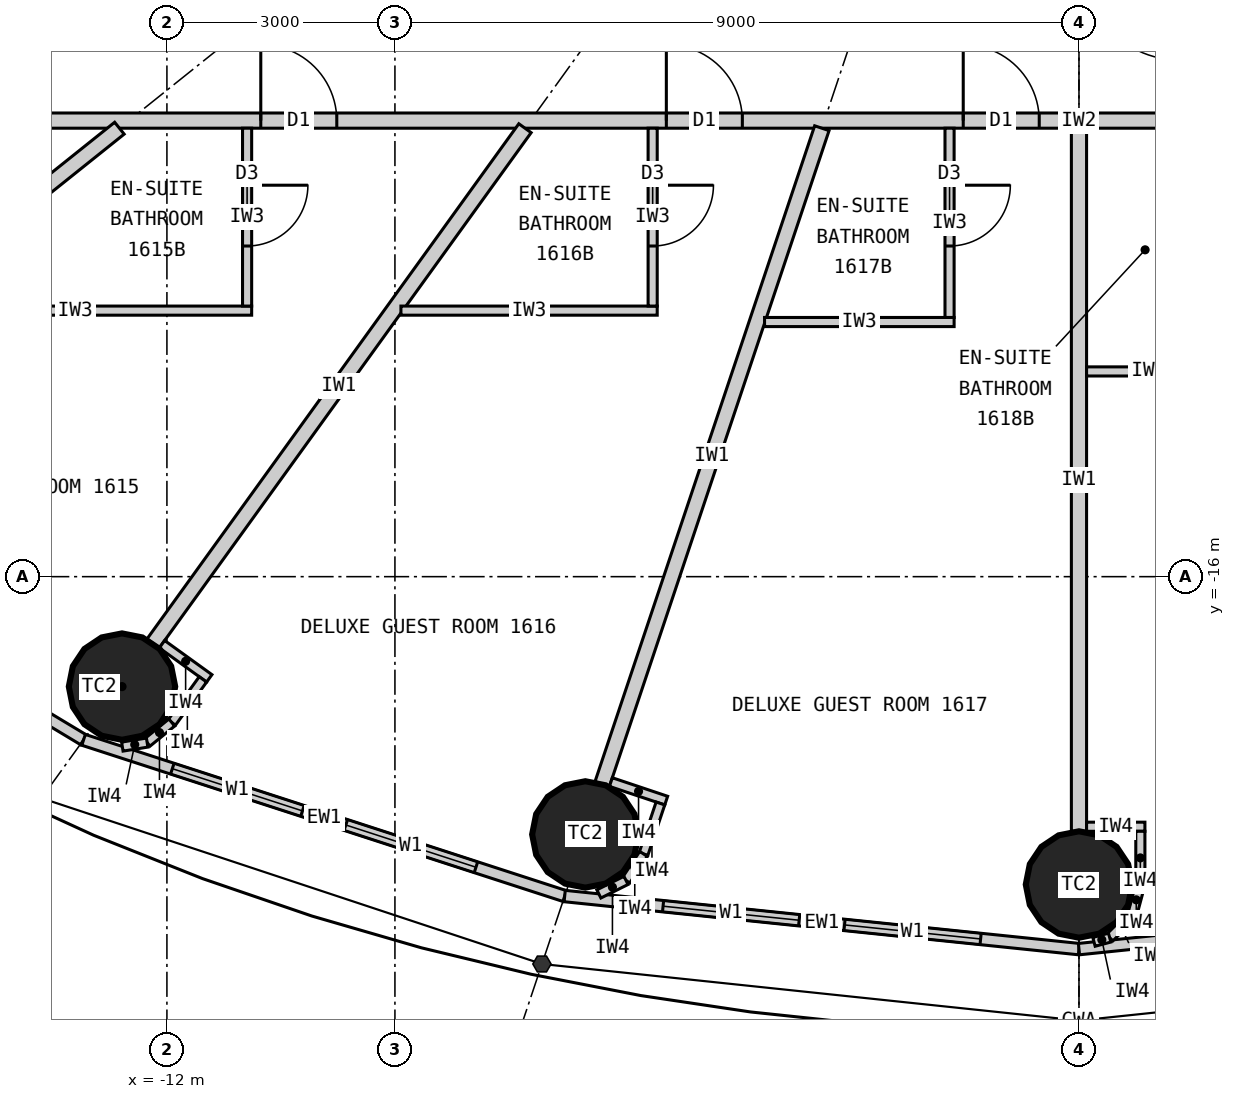
"""IFC4 building model, lengths in metres.
Left out: names, types, materials, properties, quantities, classifications, styles, units other than length and angle.
Written with IfcOpenShell. Run it as: python <this file> out.ifc"""

import sys

from ifc_helpers import new_model, si_unit, direction, frame, frame_2d, origin, origin_2d, place, context, subcontext, project, spatial, rectangle, circle, extrude, element, fill, save


model = new_model("IFC4")
c1 = context("Model", 3, precision=1e-05, world=origin(), true_north=direction((0.0, 1.0)))
c2 = subcontext(c1, "Body", "Model", "MODEL_VIEW")
j1 = project(units=[si_unit("LENGTHUNIT", "METRE"), si_unit("PLANEANGLEUNIT", "RADIAN")], contexts=[c1])
p1 = place(None, origin())
s1 = spatial("IfcSite", under=j1, at=p1, CompositionType="ELEMENT")
p2 = place(p1, origin())
s2 = spatial("IfcBuilding", under=s1, at=p2, CompositionType="ELEMENT")
p3 = place(p2, frame((0.0, 0.0, 67.2)))
s3 = spatial("IfcBuildingStorey", under=s2, at=p3, CompositionType="ELEMENT", Elevation=67.2)
for number, where, z_axis, x_axis in (
    (1, (-12.591, -17.447, 0.0), (0.0, 0.0, 1.0), (1.0, 0.0, 0.0)),
    (2, (-6.495, -19.391, 0.0), (0.0, 0.0, 1.0), (1.0, 0.0, 0.0)),
    (3, (0.0, -20.05, 0.0), (0.0, 0.0, 1.0), (1.0, 0.0, 0.0)),
):
    element("IfcColumn", number, at=place(p3, frame(where, z_axis=z_axis, x_axis=x_axis)), inside=s3, PredefinedType="COLUMN", context=c2, shape_type="SweptSolid", body=[
        extrude(circle(Radius=0.7, at=origin_2d()), origin(), (0.0, 0.0, 1.0), 3.3),
    ])
p4 = place(p3, frame((-18.57, -14.856, 0.0), z_axis=(0.0, 0.0, 1.0), x_axis=(0.856983180864, -0.515344377787, 0.0)))
e4 = element("IfcWall", 4, at=p4, inside=s3, PredefinedType="ELEMENTEDWALL", context=c2, shape_type="SweptSolid", body=[
    extrude(rectangle(XDim=6.386, YDim=0.15, at=frame_2d((3.193, 0.0))), origin(), (0.0, 0.0, 1.0), 3.12),
])
p5 = place(p4, frame((1.093, 0.0, 0.9)))
e5 = element("IfcOpeningElement", 5, at=p5, cuts=e4, PredefinedType="OPENING", context=c2, shape_type="SweptSolid", body=[
    extrude(rectangle(XDim=1.8, YDim=1.9, at=frame_2d((0.9, 0.95))), frame((0.0, 0.085, 0.0), z_axis=(0.0, -1.0, 0.0), x_axis=(1.0, 0.0, 0.0)), (0.0, 0.0, 1.0), 0.17),
])
p6 = place(p4, frame((3.493, 0.0, 0.9)))
e6 = element("IfcOpeningElement", 6, at=p6, cuts=e4, PredefinedType="OPENING", context=c2, shape_type="SweptSolid", body=[
    extrude(rectangle(XDim=1.8, YDim=1.9, at=frame_2d((0.9, 0.95))), frame((0.0, 0.085, 0.0), z_axis=(0.0, -1.0, 0.0), x_axis=(1.0, 0.0, 0.0)), (0.0, 0.0, 1.0), 0.17),
])
p7 = place(p3, frame((-13.096, -18.147, 0.0), z_axis=(0.0, 0.0, 1.0), x_axis=(0.951137534625, -0.308767534285, 0.0)))
e7 = element("IfcWall", 7, at=p7, inside=s3, PredefinedType="ELEMENTEDWALL", context=c2, shape_type="SweptSolid", body=[
    extrude(rectangle(XDim=6.655, YDim=0.15, at=frame_2d((3.328, 0.0))), origin(), (0.0, 0.0, 1.0), 3.12),
])
p8 = place(p7, frame((1.228, 0.0, 0.9)))
e8 = element("IfcOpeningElement", 8, at=p8, cuts=e7, PredefinedType="OPENING", context=c2, shape_type="SweptSolid", body=[
    extrude(rectangle(XDim=1.8, YDim=1.9, at=frame_2d((0.9, 0.95))), frame((0.0, 0.085, 0.0), z_axis=(0.0, -1.0, 0.0), x_axis=(1.0, 0.0, 0.0)), (0.0, 0.0, 1.0), 0.17),
])
p9 = place(p7, frame((3.628, 0.0, 0.9)))
e9 = element("IfcOpeningElement", 9, at=p9, cuts=e7, PredefinedType="OPENING", context=c2, shape_type="SweptSolid", body=[
    extrude(rectangle(XDim=1.8, YDim=1.9, at=frame_2d((0.9, 0.95))), frame((0.0, 0.085, 0.0), z_axis=(0.0, -1.0, 0.0), x_axis=(1.0, 0.0, 0.0)), (0.0, 0.0, 1.0), 0.17),
])
p10 = place(p3, frame((-6.766, -20.202, 0.0), z_axis=(0.0, 0.0, 1.0), x_axis=(0.994721394369, -0.102612609291, 0.0)))
e10 = element("IfcWall", 10, at=p10, inside=s3, PredefinedType="ELEMENTEDWALL", context=c2, shape_type="SweptSolid", body=[
    extrude(rectangle(XDim=6.802, YDim=0.15, at=frame_2d((3.401, 0.0))), origin(), (0.0, 0.0, 1.0), 3.12),
])
p11 = place(p10, frame((1.301, 0.0, 0.9)))
e11 = element("IfcOpeningElement", 11, at=p11, cuts=e10, PredefinedType="OPENING", context=c2, shape_type="SweptSolid", body=[
    extrude(rectangle(XDim=1.8, YDim=1.9, at=frame_2d((0.9, 0.95))), frame((0.0, 0.085, 0.0), z_axis=(0.0, -1.0, 0.0), x_axis=(1.0, 0.0, 0.0)), (0.0, 0.0, 1.0), 0.17),
])
p12 = place(p10, frame((3.701, 0.0, 0.9)))
e12 = element("IfcOpeningElement", 12, at=p12, cuts=e10, PredefinedType="OPENING", context=c2, shape_type="SweptSolid", body=[
    extrude(rectangle(XDim=1.8, YDim=1.9, at=frame_2d((0.9, 0.95))), frame((0.0, 0.085, 0.0), z_axis=(0.0, -1.0, 0.0), x_axis=(1.0, 0.0, 0.0)), (0.0, 0.0, 1.0), 0.17),
])
p13 = place(p3, frame((0.0, -20.9, 0.0), z_axis=(0.0, 0.0, 1.0), x_axis=(0.994721394369, 0.102612609291, 0.0)))
e13 = element("IfcWall", 13, at=p13, inside=s3, PredefinedType="ELEMENTEDWALL", context=c2, shape_type="SweptSolid", body=[
    extrude(rectangle(XDim=6.802, YDim=0.15, at=frame_2d((3.401, 0.0))), origin(), (0.0, 0.0, 1.0), 3.12),
])
p14 = place(p13, frame((1.301, 0.0, 0.9)))
e14 = element("IfcOpeningElement", 14, at=p14, cuts=e13, PredefinedType="OPENING", context=c2, shape_type="SweptSolid", body=[
    extrude(rectangle(XDim=1.8, YDim=1.9, at=frame_2d((0.9, 0.95))), frame((0.0, 0.085, 0.0), z_axis=(0.0, -1.0, 0.0), x_axis=(1.0, 0.0, 0.0)), (0.0, 0.0, 1.0), 0.17),
])
p15 = place(p13, frame((3.701, 0.0, 0.9)))
e15 = element("IfcOpeningElement", 15, at=p15, cuts=e13, PredefinedType="OPENING", context=c2, shape_type="SweptSolid", body=[
    extrude(rectangle(XDim=1.8, YDim=1.9, at=frame_2d((0.9, 0.95))), frame((0.0, 0.085, 0.0), z_axis=(0.0, -1.0, 0.0), x_axis=(1.0, 0.0, 0.0)), (0.0, 0.0, 1.0), 0.17),
])
p16 = place(p3, frame((14.1, -10.0, 0.0), z_axis=(0.0, 0.0, 1.0), x_axis=(-1.0, 0.0, 0.0)))
e16 = element("IfcWall", 16, at=p16, inside=s3, PredefinedType="PARTITIONING", context=c2, shape_type="SweptSolid", body=[
    extrude(rectangle(XDim=28.2, YDim=0.2, at=frame_2d((14.1, 0.0))), origin(), (0.0, 0.0, 1.0), 3.12),
])
p17 = place(p16, frame((23.865, 0.0, 0.0)))
e17 = element("IfcOpeningElement", 17, at=p17, cuts=e16, PredefinedType="OPENING", context=c2, shape_type="SweptSolid", body=[
    extrude(rectangle(XDim=1.0, YDim=2.2, at=frame_2d((0.5, 1.1))), frame((0.0, 0.11, 0.0), z_axis=(0.0, -1.0, 0.0), x_axis=(1.0, 0.0, 0.0)), (0.0, 0.0, 1.0), 0.22),
])
p18 = place(p16, frame((18.529, 0.0, 0.0)))
e18 = element("IfcOpeningElement", 18, at=p18, cuts=e16, PredefinedType="OPENING", context=c2, shape_type="SweptSolid", body=[
    extrude(rectangle(XDim=1.0, YDim=2.2, at=frame_2d((0.5, 1.1))), frame((0.0, 0.11, 0.0), z_axis=(0.0, -1.0, 0.0), x_axis=(1.0, 0.0, 0.0)), (0.0, 0.0, 1.0), 0.22),
])
p19 = place(p16, frame((14.623, 0.0, 0.0)))
e19 = element("IfcOpeningElement", 19, at=p19, cuts=e16, PredefinedType="OPENING", context=c2, shape_type="SweptSolid", body=[
    extrude(rectangle(XDim=1.0, YDim=2.2, at=frame_2d((0.5, 1.1))), frame((0.0, 0.11, 0.0), z_axis=(0.0, -1.0, 0.0), x_axis=(1.0, 0.0, 0.0)), (0.0, 0.0, 1.0), 0.22),
])
p20 = place(p16, frame((11.24, 0.0, 0.0)))
e20 = element("IfcOpeningElement", 20, at=p20, cuts=e16, PredefinedType="OPENING", context=c2, shape_type="SweptSolid", body=[
    extrude(rectangle(XDim=1.0, YDim=2.2, at=frame_2d((0.5, 1.1))), frame((0.0, 0.11, 0.0), z_axis=(0.0, -1.0, 0.0), x_axis=(1.0, 0.0, 0.0)), (0.0, 0.0, 1.0), 0.22),
])
p21 = place(p16, frame((8.671, 0.0, 0.0)))
e21 = element("IfcOpeningElement", 21, at=p21, cuts=e16, PredefinedType="OPENING", context=c2, shape_type="SweptSolid", body=[
    extrude(rectangle(XDim=1.0, YDim=2.2, at=frame_2d((0.5, 1.1))), frame((0.0, 0.11, 0.0), z_axis=(0.0, -1.0, 0.0), x_axis=(1.0, 0.0, 0.0)), (0.0, 0.0, 1.0), 0.22),
])
p22 = place(p16, frame((2.801, 0.0, 0.0)))
e22 = element("IfcOpeningElement", 22, at=p22, cuts=e16, PredefinedType="OPENING", context=c2, shape_type="SweptSolid", body=[
    extrude(rectangle(XDim=1.0, YDim=2.2, at=frame_2d((0.5, 1.1))), frame((0.0, 0.11, 0.0), z_axis=(0.0, -1.0, 0.0), x_axis=(1.0, 0.0, 0.0)), (0.0, 0.0, 1.0), 0.22),
])
p23 = place(p3, frame((-12.625, -10.1, 0.0), z_axis=(0.0, 0.0, 1.0), x_axis=(-0.780892451574, -0.624665493744, 0.0)))
e23 = element("IfcWall", 23, at=p23, inside=s3, PredefinedType="PARTITIONING", context=c2, shape_type="SweptSolid", body=[
    extrude(rectangle(XDim=6.045, YDim=0.2, at=frame_2d((3.022, 0.0))), origin(), (0.0, 0.0, 1.0), 2.32),
])
p24 = place(p3, frame((-7.289, -10.1, 0.0), z_axis=(0.0, 0.0, 1.0), x_axis=(-0.585198353053, -0.810890182197, 0.0)))
e24 = element("IfcWall", 24, at=p24, inside=s3, PredefinedType="PARTITIONING", context=c2, shape_type="SweptSolid", body=[
    extrude(rectangle(XDim=8.36, YDim=0.2, at=frame_2d((4.18, 0.0))), origin(), (0.0, 0.0, 1.0), 2.32),
])
p25 = place(p3, frame((-3.383, -10.1, 0.0), z_axis=(0.0, 0.0, 1.0), x_axis=(-0.31759592231, -0.948226149256, 0.0)))
e25 = element("IfcWall", 25, at=p25, inside=s3, PredefinedType="PARTITIONING", context=c2, shape_type="SweptSolid", body=[
    extrude(rectangle(XDim=9.098, YDim=0.2, at=frame_2d((4.549, 0.0))), origin(), (0.0, 0.0, 1.0), 2.32),
])
p26 = place(p3, frame((0.0, -10.1, 0.0), z_axis=(0.0, 0.0, 1.0), x_axis=(0.0, -1.0, 0.0)))
e26 = element("IfcWall", 26, at=p26, inside=s3, PredefinedType="PARTITIONING", context=c2, shape_type="SweptSolid", body=[
    extrude(rectangle(XDim=9.25, YDim=0.2, at=frame_2d((4.625, 0.0))), origin(), (0.0, 0.0, 1.0), 2.32),
])
p27 = place(p3, frame((-15.525, -12.5, 0.0), z_axis=(0.0, 0.0, 1.0), x_axis=(1.0, 0.0, 0.0)))
e27 = element("IfcWall", 27, at=p27, inside=s3, PredefinedType="PARTITIONING", context=c2, shape_type="SweptSolid", body=[
    extrude(rectangle(XDim=4.64, YDim=0.12, at=frame_2d((2.32, 0.0))), origin(), (0.0, 0.0, 1.0), 3.12),
])
p28 = place(p3, frame((-10.945, -10.1, 0.0), z_axis=(0.0, 0.0, 1.0), x_axis=(0.0, -1.0, 0.0)))
e28 = element("IfcWall", 28, at=p28, inside=s3, PredefinedType="PARTITIONING", context=c2, shape_type="SweptSolid", body=[
    extrude(rectangle(XDim=2.34, YDim=0.12, at=frame_2d((1.17, 0.0))), origin(), (0.0, 0.0, 1.0), 3.12),
])
p29 = place(p28, frame((0.75, 0.0, 0.0)))
e29 = element("IfcOpeningElement", 29, at=p29, cuts=e28, PredefinedType="OPENING", context=c2, shape_type="SweptSolid", body=[
    extrude(rectangle(XDim=0.8, YDim=2.1, at=frame_2d((0.4, 1.05))), frame((0.0, 0.07, 0.0), z_axis=(0.0, -1.0, 0.0), x_axis=(1.0, 0.0, 0.0)), (0.0, 0.0, 1.0), 0.14),
])
p30 = place(p3, frame((-8.921, -12.5, 0.0), z_axis=(0.0, 0.0, 1.0), x_axis=(1.0, 0.0, 0.0)))
e30 = element("IfcWall", 30, at=p30, inside=s3, PredefinedType="PARTITIONING", context=c2, shape_type="SweptSolid", body=[
    extrude(rectangle(XDim=3.372, YDim=0.12, at=frame_2d((1.686, 0.0))), origin(), (0.0, 0.0, 1.0), 3.12),
])
p31 = place(p3, frame((-5.609, -10.1, 0.0), z_axis=(0.0, 0.0, 1.0), x_axis=(0.0, -1.0, 0.0)))
e31 = element("IfcWall", 31, at=p31, inside=s3, PredefinedType="PARTITIONING", context=c2, shape_type="SweptSolid", body=[
    extrude(rectangle(XDim=2.34, YDim=0.12, at=frame_2d((1.17, 0.0))), origin(), (0.0, 0.0, 1.0), 3.12),
])
p32 = place(p31, frame((0.75, 0.0, 0.0)))
e32 = element("IfcOpeningElement", 32, at=p32, cuts=e31, PredefinedType="OPENING", context=c2, shape_type="SweptSolid", body=[
    extrude(rectangle(XDim=0.8, YDim=2.1, at=frame_2d((0.4, 1.05))), frame((0.0, 0.07, 0.0), z_axis=(0.0, -1.0, 0.0), x_axis=(1.0, 0.0, 0.0)), (0.0, 0.0, 1.0), 0.14),
])
p33 = place(p3, frame((-4.137, -12.65, 0.0), z_axis=(0.0, 0.0, 1.0), x_axis=(1.0, 0.0, 0.0)))
e33 = element("IfcWall", 33, at=p33, inside=s3, PredefinedType="PARTITIONING", context=c2, shape_type="SweptSolid", body=[
    extrude(rectangle(XDim=2.494, YDim=0.12, at=frame_2d((1.247, 0.0))), origin(), (0.0, 0.0, 1.0), 3.12),
])
p34 = place(p3, frame((-1.703, -10.1, 0.0), z_axis=(0.0, 0.0, 1.0), x_axis=(0.0, -1.0, 0.0)))
e34 = element("IfcWall", 34, at=p34, inside=s3, PredefinedType="PARTITIONING", context=c2, shape_type="SweptSolid", body=[
    extrude(rectangle(XDim=2.49, YDim=0.12, at=frame_2d((1.245, 0.0))), origin(), (0.0, 0.0, 1.0), 3.12),
])
p35 = place(p34, frame((0.75, 0.0, 0.0)))
e35 = element("IfcOpeningElement", 35, at=p35, cuts=e34, PredefinedType="OPENING", context=c2, shape_type="SweptSolid", body=[
    extrude(rectangle(XDim=0.8, YDim=2.1, at=frame_2d((0.4, 1.05))), frame((0.0, 0.07, 0.0), z_axis=(0.0, -1.0, 0.0), x_axis=(1.0, 0.0, 0.0)), (0.0, 0.0, 1.0), 0.14),
])
p36 = place(p3, frame((0.1, -13.3, 0.0), z_axis=(0.0, 0.0, 1.0), x_axis=(1.0, 0.0, 0.0)))
e36 = element("IfcWall", 36, at=p36, inside=s3, PredefinedType="PARTITIONING", context=c2, shape_type="SweptSolid", body=[
    extrude(rectangle(XDim=1.64, YDim=0.12, at=frame_2d((0.82, 0.0))), origin(), (0.0, 0.0, 1.0), 3.12),
])
p37 = place(p3, frame((-12.065, -16.889, 0.0), z_axis=(0.0, 0.0, 1.0), x_axis=(0.810821798253, -0.585293098778, 0.0)))
e37 = element("IfcWall", 37, at=p37, inside=s3, PredefinedType="PARTITIONING", context=c2, shape_type="SweptSolid", body=[
    extrude(rectangle(XDim=0.768, YDim=0.12, at=frame_2d((0.384, 0.0))), origin(), (0.0, 0.0, 1.0), 3.12),
])
p38 = place(p3, frame((-11.526, -17.351, 0.0), z_axis=(0.0, 0.0, 1.0), x_axis=(-0.585223113993, -0.810872312296, 0.0)))
e38 = element("IfcWall", 38, at=p38, inside=s3, PredefinedType="PARTITIONING", context=c2, shape_type="SweptSolid", body=[
    extrude(rectangle(XDim=0.7, YDim=0.12, at=frame_2d((0.35, 0.0))), origin(), (0.0, 0.0, 1.0), 3.12),
])
p39 = place(p3, frame((-11.936, -17.919, 0.0), z_axis=(0.0, 0.0, 1.0), x_axis=(-0.775023088441, -0.631932917629, 0.0)))
e39 = element("IfcWall", 39, at=p39, inside=s3, PredefinedType="PARTITIONING", context=c2, shape_type="SweptSolid", body=[
    extrude(rectangle(XDim=0.418, YDim=0.12, at=frame_2d((0.209, 0.0))), origin(), (0.0, 0.0, 1.0), 3.12),
])
p40 = place(p3, frame((-12.26, -18.183, 0.0), z_axis=(0.0, 0.0, 1.0), x_axis=(-0.987218661664, -0.159371622511, 0.0)))
e40 = element("IfcWall", 40, at=p40, inside=s3, PredefinedType="PARTITIONING", context=c2, shape_type="SweptSolid", body=[
    extrude(rectangle(XDim=0.331, YDim=0.12, at=frame_2d((0.166, 0.0))), origin(), (0.0, 0.0, 1.0), 3.12),
])
p41 = place(p3, frame((-6.159, -18.702, 0.0), z_axis=(0.0, 0.0, 1.0), x_axis=(0.948173154049, -0.31775410295, 0.0)))
e41 = element("IfcWall", 41, at=p41, inside=s3, PredefinedType="PARTITIONING", context=c2, shape_type="SweptSolid", body=[
    extrude(rectangle(XDim=0.768, YDim=0.12, at=frame_2d((0.384, 0.0))), origin(), (0.0, 0.0, 1.0), 3.12),
])
p42 = place(p3, frame((-5.507, -18.984, 0.0), z_axis=(0.0, 0.0, 1.0), x_axis=(-0.317692050622, -0.948193946918, 0.0)))
e42 = element("IfcWall", 42, at=p42, inside=s3, PredefinedType="PARTITIONING", context=c2, shape_type="SweptSolid", body=[
    extrude(rectangle(XDim=0.7, YDim=0.12, at=frame_2d((0.35, 0.0))), origin(), (0.0, 0.0, 1.0), 3.12),
])
p43 = place(p3, frame((-5.729, -19.648, 0.0), z_axis=(0.0, 0.0, 1.0), x_axis=(-0.552135764955, -0.833754218615, 0.0)))
e43 = element("IfcWall", 43, at=p43, inside=s3, PredefinedType="PARTITIONING", context=c2, shape_type="SweptSolid", body=[
    extrude(rectangle(XDim=0.418, YDim=0.12, at=frame_2d((0.209, 0.0))), origin(), (0.0, 0.0, 1.0), 3.12),
])
p44 = place(p3, frame((-5.96, -19.996, 0.0), z_axis=(0.0, 0.0, 1.0), x_axis=(-0.895160725913, -0.445743507842, 0.0)))
e44 = element("IfcWall", 44, at=p44, inside=s3, PredefinedType="PARTITIONING", context=c2, shape_type="SweptSolid", body=[
    extrude(rectangle(XDim=0.399, YDim=0.12, at=frame_2d((0.199, 0.0))), origin(), (0.0, 0.0, 1.0), 3.12),
])
p45 = place(p3, frame((0.1, -19.29, 0.0), z_axis=(0.0, 0.0, 1.0), x_axis=(1.0, 0.0, 0.0)))
e45 = element("IfcWall", 45, at=p45, inside=s3, PredefinedType="PARTITIONING", context=c2, shape_type="SweptSolid", body=[
    extrude(rectangle(XDim=0.767, YDim=0.12, at=frame_2d((0.384, 0.0))), origin(), (0.0, 0.0, 1.0), 3.12),
])
p46 = place(p3, frame((0.808, -19.35, 0.0), z_axis=(0.0, 0.0, 1.0), x_axis=(0.0, -1.0, 0.0)))
e46 = element("IfcWall", 46, at=p46, inside=s3, PredefinedType="PARTITIONING", context=c2, shape_type="SweptSolid", body=[
    extrude(rectangle(XDim=0.7, YDim=0.12, at=frame_2d((0.35, 0.0))), origin(), (0.0, 0.0, 1.0), 3.12),
])
p47 = place(p3, frame((0.808, -20.05, 0.0), z_axis=(0.0, 0.0, 1.0), x_axis=(-0.2592614205, -0.965807183573, 0.0)))
e47 = element("IfcWall", 47, at=p47, inside=s3, PredefinedType="PARTITIONING", context=c2, shape_type="SweptSolid", body=[
    extrude(rectangle(XDim=0.418, YDim=0.12, at=frame_2d((0.209, 0.0))), origin(), (0.0, 0.0, 1.0), 3.12),
])
p48 = place(p3, frame((0.699, -20.454, 0.0), z_axis=(0.0, 0.0, 1.0), x_axis=(-0.707106781187, -0.707106781187, 0.0)))
e48 = element("IfcWall", 48, at=p48, inside=s3, PredefinedType="PARTITIONING", context=c2, shape_type="SweptSolid", body=[
    extrude(rectangle(XDim=0.418, YDim=0.12, at=frame_2d((0.209, 0.0))), origin(), (0.0, 0.0, 1.0), 3.12),
])
p49 = place(p3, frame((0.404, -20.749, 0.0), z_axis=(0.0, 0.0, 1.0), x_axis=(-0.965759066438, -0.25944060128, 0.0)))
e49 = element("IfcWall", 49, at=p49, inside=s3, PredefinedType="PARTITIONING", context=c2, shape_type="SweptSolid", body=[
    extrude(rectangle(XDim=0.214, YDim=0.12, at=frame_2d((0.107, 0.0))), origin(), (0.0, 0.0, 1.0), 3.12),
])
p50 = place(p8, origin())
e50 = element("IfcWindow", 50, at=p50, inside=s3, PartitioningType="SINGLE_PANEL", PredefinedType="WINDOW", context=c2, shape_type="SweptSolid", body=[
    extrude(rectangle(XDim=1.8, YDim=1.9, at=frame_2d((0.9, 0.95))), frame((0.0, 0.03, 0.0), z_axis=(0.0, -1.0, 0.0), x_axis=(1.0, 0.0, 0.0)), (0.0, 0.0, 1.0), 0.06),
])
fill(e8, e50)
p51 = place(p9, origin())
e51 = element("IfcWindow", 51, at=p51, inside=s3, PartitioningType="SINGLE_PANEL", PredefinedType="WINDOW", context=c2, shape_type="SweptSolid", body=[
    extrude(rectangle(XDim=1.8, YDim=1.9, at=frame_2d((0.9, 0.95))), frame((0.0, 0.03, 0.0), z_axis=(0.0, -1.0, 0.0), x_axis=(1.0, 0.0, 0.0)), (0.0, 0.0, 1.0), 0.06),
])
fill(e9, e51)
p52 = place(p11, origin())
e52 = element("IfcWindow", 52, at=p52, inside=s3, PartitioningType="SINGLE_PANEL", PredefinedType="WINDOW", context=c2, shape_type="SweptSolid", body=[
    extrude(rectangle(XDim=1.8, YDim=1.9, at=frame_2d((0.9, 0.95))), frame((0.0, 0.03, 0.0), z_axis=(0.0, -1.0, 0.0), x_axis=(1.0, 0.0, 0.0)), (0.0, 0.0, 1.0), 0.06),
])
fill(e11, e52)
p53 = place(p12, origin())
e53 = element("IfcWindow", 53, at=p53, inside=s3, PartitioningType="SINGLE_PANEL", PredefinedType="WINDOW", context=c2, shape_type="SweptSolid", body=[
    extrude(rectangle(XDim=1.8, YDim=1.9, at=frame_2d((0.9, 0.95))), frame((0.0, 0.03, 0.0), z_axis=(0.0, -1.0, 0.0), x_axis=(1.0, 0.0, 0.0)), (0.0, 0.0, 1.0), 0.06),
])
fill(e12, e53)
p54 = place(p29, origin())
e54 = element("IfcDoor", 54, at=p54, inside=s3, OperationType="SINGLE_SWING_LEFT", PredefinedType="DOOR", context=c2, shape_type="SweptSolid", body=[
    extrude(rectangle(XDim=0.8, YDim=2.1, at=frame_2d((0.4, 1.05))), frame((0.0, 0.025, 0.0), z_axis=(0.0, -1.0, 0.0), x_axis=(1.0, 0.0, 0.0)), (0.0, 0.0, 1.0), 0.05),
])
fill(e29, e54)
p55 = place(p17, origin())
e55 = element("IfcDoor", 55, at=p55, inside=s3, OperationType="SINGLE_SWING_RIGHT", PredefinedType="DOOR", context=c2, shape_type="SweptSolid", body=[
    extrude(rectangle(XDim=1.0, YDim=2.2, at=frame_2d((0.5, 1.1))), frame((0.0, 0.025, 0.0), z_axis=(0.0, -1.0, 0.0), x_axis=(1.0, 0.0, 0.0)), (0.0, 0.0, 1.0), 0.05),
])
fill(e17, e55)
p56 = place(p32, origin())
e56 = element("IfcDoor", 56, at=p56, inside=s3, OperationType="SINGLE_SWING_LEFT", PredefinedType="DOOR", context=c2, shape_type="SweptSolid", body=[
    extrude(rectangle(XDim=0.8, YDim=2.1, at=frame_2d((0.4, 1.05))), frame((0.0, 0.025, 0.0), z_axis=(0.0, -1.0, 0.0), x_axis=(1.0, 0.0, 0.0)), (0.0, 0.0, 1.0), 0.05),
])
fill(e32, e56)
p57 = place(p18, origin())
e57 = element("IfcDoor", 57, at=p57, inside=s3, OperationType="SINGLE_SWING_RIGHT", PredefinedType="DOOR", context=c2, shape_type="SweptSolid", body=[
    extrude(rectangle(XDim=1.0, YDim=2.2, at=frame_2d((0.5, 1.1))), frame((0.0, 0.025, 0.0), z_axis=(0.0, -1.0, 0.0), x_axis=(1.0, 0.0, 0.0)), (0.0, 0.0, 1.0), 0.05),
])
fill(e18, e57)
p58 = place(p35, origin())
e58 = element("IfcDoor", 58, at=p58, inside=s3, OperationType="SINGLE_SWING_LEFT", PredefinedType="DOOR", context=c2, shape_type="SweptSolid", body=[
    extrude(rectangle(XDim=0.8, YDim=2.1, at=frame_2d((0.4, 1.05))), frame((0.0, 0.025, 0.0), z_axis=(0.0, -1.0, 0.0), x_axis=(1.0, 0.0, 0.0)), (0.0, 0.0, 1.0), 0.05),
])
fill(e35, e58)
p59 = place(p19, origin())
e59 = element("IfcDoor", 59, at=p59, inside=s3, OperationType="SINGLE_SWING_RIGHT", PredefinedType="DOOR", context=c2, shape_type="SweptSolid", body=[
    extrude(rectangle(XDim=1.0, YDim=2.2, at=frame_2d((0.5, 1.1))), frame((0.0, 0.025, 0.0), z_axis=(0.0, -1.0, 0.0), x_axis=(1.0, 0.0, 0.0)), (0.0, 0.0, 1.0), 0.05),
])
fill(e19, e59)
save(model, sys.argv[1])
